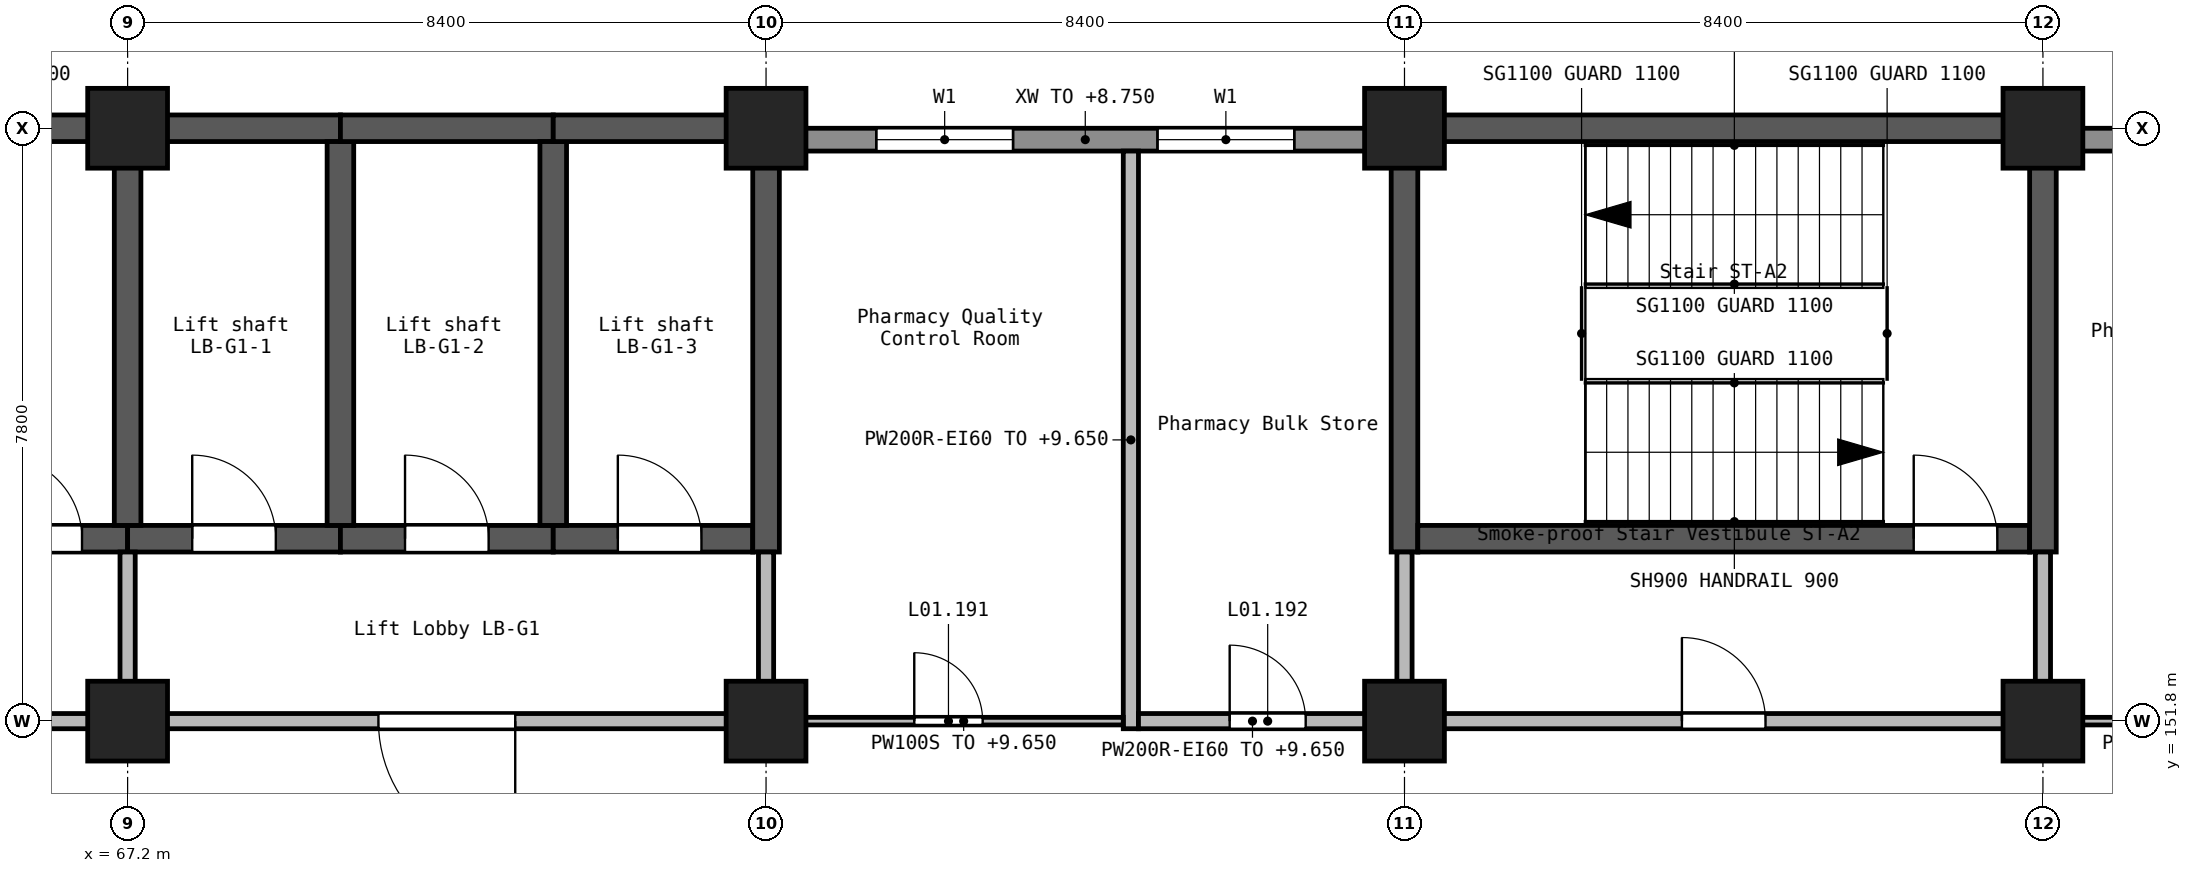
"""IFC4 building model, lengths in metres.
Left out: names, types, materials, properties, quantities, classifications, styles, units other than length and angle.
Written with IfcOpenShell. Run it as: python <this file> out.ifc"""

import sys

from ifc_helpers import new_model, si_unit, direction, frame, frame_2d, origin, origin_2d, place, context, subcontext, project, spatial, rectangle, extrude, element, fill, save


model = new_model("IFC4")
c1 = context("Model", 3, precision=1e-05, world=origin(), true_north=direction((0.0, 1.0)))
c2 = subcontext(c1, "Body", "Model", "MODEL_VIEW")
j1 = project(units=[si_unit("LENGTHUNIT", "METRE"), si_unit("PLANEANGLEUNIT", "RADIAN")], contexts=[c1])
p1 = place(None, origin())
s1 = spatial("IfcSite", under=j1, at=p1, CompositionType="ELEMENT")
p2 = place(p1, origin())
s2 = spatial("IfcBuilding", under=s1, at=p2, CompositionType="ELEMENT")
p3 = place(p2, frame((0.0, 0.0, 5.4)))
s3 = spatial("IfcBuildingStorey", under=s2, at=p3, CompositionType="ELEMENT", Elevation=5.4)
for number, where, z_axis, x_axis in (
    (1, (67.2, 151.8, 0.0), (0.0, 0.0, 1.0), (1.0, 0.0, 0.0)),
    (2, (67.2, 159.6, 0.0), (0.0, 0.0, 1.0), (1.0, 0.0, 0.0)),
    (3, (75.6, 151.8, 0.0), (0.0, 0.0, 1.0), (1.0, 0.0, 0.0)),
    (4, (75.6, 159.6, 0.0), (0.0, 0.0, 1.0), (1.0, 0.0, 0.0)),
    (5, (84.0, 151.8, 0.0), (0.0, 0.0, 1.0), (1.0, 0.0, 0.0)),
    (6, (84.0, 159.6, 0.0), (0.0, 0.0, 1.0), (1.0, 0.0, 0.0)),
    (7, (92.4, 151.8, 0.0), (0.0, 0.0, 1.0), (1.0, 0.0, 0.0)),
    (8, (92.4, 159.6, 0.0), (0.0, 0.0, 1.0), (1.0, 0.0, 0.0)),
):
    element("IfcColumn", number, at=place(p3, frame(where, z_axis=z_axis, x_axis=x_axis)), inside=s3, PredefinedType="COLUMN", context=c2, shape_type="SweptSolid", body=[
        extrude(rectangle(XDim=1.05, YDim=1.05, at=origin_2d()), origin(), (0.0, 0.0, 1.0), 4.5),
    ])
p4 = place(p3, frame((58.625, 159.6, 0.0), z_axis=(0.0, 0.0, 1.0), x_axis=(1.0, 0.0, 0.0)))
e9 = element("IfcWall", 9, at=p4, inside=s3, PredefinedType="SHEAR", context=c2, shape_type="SweptSolid", body=[
    extrude(rectangle(XDim=8.575, YDim=0.35, at=frame_2d((4.288, 0.0))), origin(), (0.0, 0.0, 1.0), 4.5),
])
p5 = place(p3, frame((58.975, 154.2, 0.0), z_axis=(0.0, 0.0, 1.0), x_axis=(1.0, 0.0, 0.0)))
e10 = element("IfcWall", 10, at=p5, inside=s3, PredefinedType="SHEAR", context=c2, shape_type="SweptSolid", body=[
    extrude(rectangle(XDim=8.225, YDim=0.35, at=frame_2d((4.112, 0.0))), origin(), (0.0, 0.0, 1.0), 4.5),
])
p6 = place(p5, frame((6.525, 0.0, 0.0)))
e11 = element("IfcOpeningElement", 11, at=p6, cuts=e10, PredefinedType="OPENING", context=c2, shape_type="SweptSolid", body=[
    extrude(rectangle(XDim=1.1, YDim=2.1, at=frame_2d((0.55, 1.05))), frame((0.0, 0.185, 0.0), z_axis=(0.0, -1.0, 0.0), x_axis=(1.0, 0.0, 0.0)), (0.0, 0.0, 1.0), 0.37),
])
p7 = place(p3, frame((67.2, 154.2, 0.0), z_axis=(0.0, 0.0, 1.0), x_axis=(1.0, 0.0, 0.0)))
e12 = element("IfcWall", 12, at=p7, inside=s3, PredefinedType="SHEAR", context=c2, shape_type="SweptSolid", body=[
    extrude(rectangle(XDim=2.8, YDim=0.35, at=frame_2d((1.4, 0.0))), origin(), (0.0, 0.0, 1.0), 4.5),
])
p8 = place(p7, frame((0.85, 0.0, 0.0)))
e13 = element("IfcOpeningElement", 13, at=p8, cuts=e12, PredefinedType="OPENING", context=c2, shape_type="SweptSolid", body=[
    extrude(rectangle(XDim=1.1, YDim=2.1, at=frame_2d((0.55, 1.05))), frame((0.0, 0.185, 0.0), z_axis=(0.0, -1.0, 0.0), x_axis=(1.0, 0.0, 0.0)), (0.0, 0.0, 1.0), 0.37),
])
p9 = place(p3, frame((67.2, 154.375, 0.0), z_axis=(0.0, 0.0, 1.0), x_axis=(0.0, 1.0, 0.0)))
e14 = element("IfcWall", 14, at=p9, inside=s3, PredefinedType="SHEAR", context=c2, shape_type="SweptSolid", body=[
    extrude(rectangle(XDim=5.05, YDim=0.35, at=frame_2d((2.525, 0.0))), origin(), (0.0, 0.0, 1.0), 4.5),
])
p10 = place(p3, frame((67.2, 159.6, 0.0), z_axis=(0.0, 0.0, 1.0), x_axis=(1.0, 0.0, 0.0)))
e15 = element("IfcWall", 15, at=p10, inside=s3, PredefinedType="SHEAR", context=c2, shape_type="SweptSolid", body=[
    extrude(rectangle(XDim=2.8, YDim=0.35, at=frame_2d((1.4, 0.0))), origin(), (0.0, 0.0, 1.0), 4.5),
])
p11 = place(p3, frame((70.0, 154.2, 0.0), z_axis=(0.0, 0.0, 1.0), x_axis=(1.0, 0.0, 0.0)))
e16 = element("IfcWall", 16, at=p11, inside=s3, PredefinedType="SHEAR", context=c2, shape_type="SweptSolid", body=[
    extrude(rectangle(XDim=2.8, YDim=0.35, at=frame_2d((1.4, 0.0))), origin(), (0.0, 0.0, 1.0), 4.5),
])
p12 = place(p11, frame((0.85, 0.0, 0.0)))
e17 = element("IfcOpeningElement", 17, at=p12, cuts=e16, PredefinedType="OPENING", context=c2, shape_type="SweptSolid", body=[
    extrude(rectangle(XDim=1.1, YDim=2.1, at=frame_2d((0.55, 1.05))), frame((0.0, 0.185, 0.0), z_axis=(0.0, -1.0, 0.0), x_axis=(1.0, 0.0, 0.0)), (0.0, 0.0, 1.0), 0.37),
])
p13 = place(p3, frame((70.0, 154.375, 0.0), z_axis=(0.0, 0.0, 1.0), x_axis=(0.0, 1.0, 0.0)))
e18 = element("IfcWall", 18, at=p13, inside=s3, PredefinedType="SHEAR", context=c2, shape_type="SweptSolid", body=[
    extrude(rectangle(XDim=5.05, YDim=0.35, at=frame_2d((2.525, 0.0))), origin(), (0.0, 0.0, 1.0), 4.5),
])
p14 = place(p3, frame((70.0, 159.6, 0.0), z_axis=(0.0, 0.0, 1.0), x_axis=(1.0, 0.0, 0.0)))
e19 = element("IfcWall", 19, at=p14, inside=s3, PredefinedType="SHEAR", context=c2, shape_type="SweptSolid", body=[
    extrude(rectangle(XDim=2.8, YDim=0.35, at=frame_2d((1.4, 0.0))), origin(), (0.0, 0.0, 1.0), 4.5),
])
p15 = place(p3, frame((72.8, 154.2, 0.0), z_axis=(0.0, 0.0, 1.0), x_axis=(1.0, 0.0, 0.0)))
e20 = element("IfcWall", 20, at=p15, inside=s3, PredefinedType="SHEAR", context=c2, shape_type="SweptSolid", body=[
    extrude(rectangle(XDim=2.625, YDim=0.35, at=frame_2d((1.312, 0.0))), origin(), (0.0, 0.0, 1.0), 4.5),
])
p16 = place(p15, frame((0.85, 0.0, 0.0)))
e21 = element("IfcOpeningElement", 21, at=p16, cuts=e20, PredefinedType="OPENING", context=c2, shape_type="SweptSolid", body=[
    extrude(rectangle(XDim=1.1, YDim=2.1, at=frame_2d((0.55, 1.05))), frame((0.0, 0.185, 0.0), z_axis=(0.0, -1.0, 0.0), x_axis=(1.0, 0.0, 0.0)), (0.0, 0.0, 1.0), 0.37),
])
p17 = place(p3, frame((72.8, 154.375, 0.0), z_axis=(0.0, 0.0, 1.0), x_axis=(0.0, 1.0, 0.0)))
e22 = element("IfcWall", 22, at=p17, inside=s3, PredefinedType="SHEAR", context=c2, shape_type="SweptSolid", body=[
    extrude(rectangle(XDim=5.05, YDim=0.35, at=frame_2d((2.525, 0.0))), origin(), (0.0, 0.0, 1.0), 4.5),
])
p18 = place(p3, frame((72.8, 159.6, 0.0), z_axis=(0.0, 0.0, 1.0), x_axis=(1.0, 0.0, 0.0)))
e23 = element("IfcWall", 23, at=p18, inside=s3, PredefinedType="SHEAR", context=c2, shape_type="SweptSolid", body=[
    extrude(rectangle(XDim=2.625, YDim=0.35, at=frame_2d((1.312, 0.0))), origin(), (0.0, 0.0, 1.0), 4.5),
])
p19 = place(p3, frame((75.6, 154.025, 0.0), z_axis=(0.0, 0.0, 1.0), x_axis=(0.0, 1.0, 0.0)))
e24 = element("IfcWall", 24, at=p19, inside=s3, PredefinedType="SHEAR", context=c2, shape_type="SweptSolid", body=[
    extrude(rectangle(XDim=5.75, YDim=0.35, at=frame_2d((2.875, 0.0))), origin(), (0.0, 0.0, 1.0), 4.5),
])
p20 = place(p3, frame((83.825, 159.6, 0.0), z_axis=(0.0, 0.0, 1.0), x_axis=(1.0, 0.0, 0.0)))
e25 = element("IfcWall", 25, at=p20, inside=s3, PredefinedType="SHEAR", context=c2, shape_type="SweptSolid", body=[
    extrude(rectangle(XDim=8.4, YDim=0.35, at=frame_2d((4.2, 0.0))), origin(), (0.0, 0.0, 1.0), 4.5),
])
p21 = place(p3, frame((84.0, 154.025, 0.0), z_axis=(0.0, 0.0, 1.0), x_axis=(0.0, 1.0, 0.0)))
e26 = element("IfcWall", 26, at=p21, inside=s3, PredefinedType="SHEAR", context=c2, shape_type="SweptSolid", body=[
    extrude(rectangle(XDim=5.4, YDim=0.35, at=frame_2d((2.7, 0.0))), origin(), (0.0, 0.0, 1.0), 4.5),
])
p22 = place(p3, frame((84.175, 154.2, 0.0), z_axis=(0.0, 0.0, 1.0), x_axis=(1.0, 0.0, 0.0)))
e27 = element("IfcWall", 27, at=p22, inside=s3, PredefinedType="SHEAR", context=c2, shape_type="SweptSolid", body=[
    extrude(rectangle(XDim=8.05, YDim=0.35, at=frame_2d((4.025, 0.0))), origin(), (0.0, 0.0, 1.0), 4.5),
])
p23 = place(p22, frame((6.525, 0.0, 0.0)))
e28 = element("IfcOpeningElement", 28, at=p23, cuts=e27, PredefinedType="OPENING", context=c2, shape_type="SweptSolid", body=[
    extrude(rectangle(XDim=1.1, YDim=2.1, at=frame_2d((0.55, 1.05))), frame((0.0, 0.185, 0.0), z_axis=(0.0, -1.0, 0.0), x_axis=(1.0, 0.0, 0.0)), (0.0, 0.0, 1.0), 0.37),
])
p24 = place(p3, frame((92.4, 154.025, 0.0), z_axis=(0.0, 0.0, 1.0), x_axis=(0.0, 1.0, 0.0)))
e29 = element("IfcWall", 29, at=p24, inside=s3, PredefinedType="SHEAR", context=c2, shape_type="SweptSolid", body=[
    extrude(rectangle(XDim=5.75, YDim=0.35, at=frame_2d((2.875, 0.0))), origin(), (0.0, 0.0, 1.0), 4.5),
])
p25 = place(p3, frame((100.3, 159.45, 0.0), z_axis=(0.0, 0.0, 1.0), x_axis=(-1.0, 0.0, 0.0)))
e30 = element("IfcWall", 30, at=p25, inside=s3, PredefinedType="STANDARD", context=c2, shape_type="SweptSolid", body=[
    extrude(rectangle(XDim=7.4, YDim=0.3, at=frame_2d((3.7, 0.0))), origin(), (0.0, 0.0, 1.0), 3.35),
])
p26 = place(p25, frame((0.95, 0.0, 0.9)))
e31 = element("IfcOpeningElement", 31, at=p26, cuts=e30, PredefinedType="OPENING", context=c2, shape_type="SweptSolid", body=[
    extrude(rectangle(XDim=1.8, YDim=1.5, at=frame_2d((0.9, 0.75))), frame((0.0, 0.16, 0.0), z_axis=(0.0, -1.0, 0.0), x_axis=(1.0, 0.0, 0.0)), (0.0, 0.0, 1.0), 0.32),
])
p27 = place(p25, frame((4.65, 0.0, 0.9)))
e32 = element("IfcOpeningElement", 32, at=p27, cuts=e30, PredefinedType="OPENING", context=c2, shape_type="SweptSolid", body=[
    extrude(rectangle(XDim=1.8, YDim=1.5, at=frame_2d((0.9, 0.75))), frame((0.0, 0.16, 0.0), z_axis=(0.0, -1.0, 0.0), x_axis=(1.0, 0.0, 0.0)), (0.0, 0.0, 1.0), 0.32),
])
p28 = place(p3, frame((83.5, 159.45, 0.0), z_axis=(0.0, 0.0, 1.0), x_axis=(-1.0, 0.0, 0.0)))
e33 = element("IfcWall", 33, at=p28, inside=s3, PredefinedType="STANDARD", context=c2, shape_type="SweptSolid", body=[
    extrude(rectangle(XDim=7.4, YDim=0.3, at=frame_2d((3.7, 0.0))), origin(), (0.0, 0.0, 1.0), 3.35),
])
p29 = place(p28, frame((0.95, 0.0, 0.9)))
e34 = element("IfcOpeningElement", 34, at=p29, cuts=e33, PredefinedType="OPENING", context=c2, shape_type="SweptSolid", body=[
    extrude(rectangle(XDim=1.8, YDim=1.5, at=frame_2d((0.9, 0.75))), frame((0.0, 0.16, 0.0), z_axis=(0.0, -1.0, 0.0), x_axis=(1.0, 0.0, 0.0)), (0.0, 0.0, 1.0), 0.32),
])
p30 = place(p28, frame((4.65, 0.0, 0.9)))
e35 = element("IfcOpeningElement", 35, at=p30, cuts=e33, PredefinedType="OPENING", context=c2, shape_type="SweptSolid", body=[
    extrude(rectangle(XDim=1.8, YDim=1.5, at=frame_2d((0.9, 0.75))), frame((0.0, 0.16, 0.0), z_axis=(0.0, -1.0, 0.0), x_axis=(1.0, 0.0, 0.0)), (0.0, 0.0, 1.0), 0.32),
])
p31 = place(p3, frame((75.1, 151.8, 0.0), z_axis=(0.0, 0.0, 1.0), x_axis=(-1.0, 0.0, 0.0)))
e36 = element("IfcWall", 36, at=p31, inside=s3, PredefinedType="SOLIDWALL", context=c2, shape_type="SweptSolid", body=[
    extrude(rectangle(XDim=7.4, YDim=0.2, at=frame_2d((3.7, 0.0))), origin(), (0.0, 0.0, 1.0), 4.25),
])
p32 = place(p31, frame((2.8, 0.0, 0.0)))
e37 = element("IfcOpeningElement", 37, at=p32, cuts=e36, PredefinedType="OPENING", context=c2, shape_type="SweptSolid", body=[
    extrude(rectangle(XDim=1.8, YDim=2.1, at=frame_2d((0.9, 1.05))), frame((0.0, 0.11, 0.0), z_axis=(0.0, -1.0, 0.0), x_axis=(1.0, 0.0, 0.0)), (0.0, 0.0, 1.0), 0.22),
])
p33 = place(p3, frame((66.7, 151.8, 0.0), z_axis=(0.0, 0.0, 1.0), x_axis=(-1.0, 0.0, 0.0)))
e38 = element("IfcWall", 38, at=p33, inside=s3, PredefinedType="SOLIDWALL", context=c2, shape_type="SweptSolid", body=[
    extrude(rectangle(XDim=7.4, YDim=0.2, at=frame_2d((3.7, 0.0))), origin(), (0.0, 0.0, 1.0), 4.25),
])
p34 = place(p33, frame((3.15, 0.0, 0.0)))
e39 = element("IfcOpeningElement", 39, at=p34, cuts=e38, PredefinedType="OPENING", context=c2, shape_type="SweptSolid", body=[
    extrude(rectangle(XDim=1.1, YDim=2.1, at=frame_2d((0.55, 1.05))), frame((0.0, 0.11, 0.0), z_axis=(0.0, -1.0, 0.0), x_axis=(1.0, 0.0, 0.0)), (0.0, 0.0, 1.0), 0.22),
])
p35 = place(p3, frame((84.5, 151.8, 0.0), z_axis=(0.0, 0.0, 1.0), x_axis=(1.0, 0.0, 0.0)))
e40 = element("IfcWall", 40, at=p35, inside=s3, PredefinedType="SOLIDWALL", context=c2, shape_type="SweptSolid", body=[
    extrude(rectangle(XDim=7.4, YDim=0.2, at=frame_2d((3.7, 0.0))), origin(), (0.0, 0.0, 1.0), 4.25),
])
p36 = place(p35, frame((3.15, 0.0, 0.0)))
e41 = element("IfcOpeningElement", 41, at=p36, cuts=e40, PredefinedType="OPENING", context=c2, shape_type="SweptSolid", body=[
    extrude(rectangle(XDim=1.1, YDim=2.1, at=frame_2d((0.55, 1.05))), frame((0.0, 0.11, 0.0), z_axis=(0.0, -1.0, 0.0), x_axis=(1.0, 0.0, 0.0)), (0.0, 0.0, 1.0), 0.22),
])
p37 = place(p3, frame((80.4, 151.7, 0.0), z_axis=(0.0, 0.0, 1.0), x_axis=(0.0, 1.0, 0.0)))
e42 = element("IfcWall", 42, at=p37, inside=s3, PredefinedType="SOLIDWALL", context=c2, shape_type="SweptSolid", body=[
    extrude(rectangle(XDim=7.6, YDim=0.2, at=frame_2d((3.8, 0.0))), origin(), (0.0, 0.0, 1.0), 4.25),
])
p38 = place(p3, frame((80.5, 151.8, 0.0), z_axis=(0.0, 0.0, 1.0), x_axis=(1.0, 0.0, 0.0)))
e43 = element("IfcWall", 43, at=p38, inside=s3, PredefinedType="SOLIDWALL", context=c2, shape_type="SweptSolid", body=[
    extrude(rectangle(XDim=3.0, YDim=0.2, at=frame_2d((1.5, 0.0))), origin(), (0.0, 0.0, 1.0), 4.25),
])
p39 = place(p38, frame((1.2, 0.0, 0.0)))
e44 = element("IfcOpeningElement", 44, at=p39, cuts=e43, PredefinedType="OPENING", context=c2, shape_type="SweptSolid", body=[
    extrude(rectangle(XDim=1.0, YDim=2.1, at=frame_2d((0.5, 1.05))), frame((0.0, 0.11, 0.0), z_axis=(0.0, -1.0, 0.0), x_axis=(1.0, 0.0, 0.0)), (0.0, 0.0, 1.0), 0.22),
])
for number, where, z_axis, x_axis in (
    (45, (67.2, 152.3, 0.0), (0.0, 0.0, 1.0), (0.0, 1.0, 0.0)),
    (46, (75.6, 152.3, 0.0), (0.0, 0.0, 1.0), (0.0, 1.0, 0.0)),
    (47, (84.0, 152.3, 0.0), (0.0, 0.0, 1.0), (0.0, 1.0, 0.0)),
    (48, (92.4, 152.3, 0.0), (0.0, 0.0, 1.0), (0.0, 1.0, 0.0)),
):
    element("IfcWall", number, at=place(p3, frame(where, z_axis=z_axis, x_axis=x_axis)), inside=s3, PredefinedType="SOLIDWALL", context=c2, shape_type="SweptSolid", body=[
        extrude(rectangle(XDim=1.725, YDim=0.2, at=frame_2d((0.862, 0.0))), origin(), (0.0, 0.0, 1.0), 4.25),
    ])
p40 = place(p3, frame((76.1, 151.8, 0.0), z_axis=(0.0, 0.0, 1.0), x_axis=(1.0, 0.0, 0.0)))
e49 = element("IfcWall", 49, at=p40, inside=s3, PredefinedType="PARTITIONING", context=c2, shape_type="SweptSolid", body=[
    extrude(rectangle(XDim=4.2, YDim=0.1, at=frame_2d((2.1, 0.0))), origin(), (0.0, 0.0, 1.0), 4.25),
])
p41 = place(p40, frame((1.45, 0.0, 0.0)))
e50 = element("IfcOpeningElement", 50, at=p41, cuts=e49, PredefinedType="OPENING", context=c2, shape_type="SweptSolid", body=[
    extrude(rectangle(XDim=0.9, YDim=2.1, at=frame_2d((0.45, 1.05))), frame((0.0, 0.06, 0.0), z_axis=(0.0, -1.0, 0.0), x_axis=(1.0, 0.0, 0.0)), (0.0, 0.0, 1.0), 0.12),
])
p42 = place(p3, frame((92.9, 151.8, 0.0), z_axis=(0.0, 0.0, 1.0), x_axis=(1.0, 0.0, 0.0)))
e51 = element("IfcWall", 51, at=p42, inside=s3, PredefinedType="PARTITIONING", context=c2, shape_type="SweptSolid", body=[
    extrude(rectangle(XDim=3.0, YDim=0.1, at=frame_2d((1.5, 0.0))), origin(), (0.0, 0.0, 1.0), 4.25),
])
p43 = place(p42, frame((0.85, 0.0, 0.0)))
e52 = element("IfcOpeningElement", 52, at=p43, cuts=e51, PredefinedType="OPENING", context=c2, shape_type="SweptSolid", body=[
    extrude(rectangle(XDim=0.9, YDim=2.1, at=frame_2d((0.45, 1.05))), frame((0.0, 0.06, 0.0), z_axis=(0.0, -1.0, 0.0), x_axis=(1.0, 0.0, 0.0)), (0.0, 0.0, 1.0), 0.12),
])
p44 = place(p29, origin())
e53 = element("IfcWindow", 53, at=p44, inside=s3, PartitioningType="SINGLE_PANEL", PredefinedType="WINDOW", context=c2, shape_type="SweptSolid", body=[
    extrude(rectangle(XDim=1.8, YDim=1.5, at=frame_2d((0.9, 0.75))), frame((0.0, 0.03, 0.0), z_axis=(0.0, -1.0, 0.0), x_axis=(1.0, 0.0, 0.0)), (0.0, 0.0, 1.0), 0.06),
])
fill(e34, e53)
p45 = place(p30, origin())
e54 = element("IfcWindow", 54, at=p45, inside=s3, PartitioningType="SINGLE_PANEL", PredefinedType="WINDOW", context=c2, shape_type="SweptSolid", body=[
    extrude(rectangle(XDim=1.8, YDim=1.5, at=frame_2d((0.9, 0.75))), frame((0.0, 0.03, 0.0), z_axis=(0.0, -1.0, 0.0), x_axis=(1.0, 0.0, 0.0)), (0.0, 0.0, 1.0), 0.06),
])
fill(e35, e54)
p46 = place(p8, origin())
e55 = element("IfcDoor", 55, at=p46, inside=s3, OperationType="DOUBLE_DOOR_SLIDING", PredefinedType="DOOR", context=c2, shape_type="SweptSolid", body=[
    extrude(rectangle(XDim=1.1, YDim=2.1, at=frame_2d((0.55, 1.05))), frame((0.0, 0.025, 0.0), z_axis=(0.0, -1.0, 0.0), x_axis=(1.0, 0.0, 0.0)), (0.0, 0.0, 1.0), 0.05),
])
fill(e13, e55)
p47 = place(p12, origin())
e56 = element("IfcDoor", 56, at=p47, inside=s3, OperationType="DOUBLE_DOOR_SLIDING", PredefinedType="DOOR", context=c2, shape_type="SweptSolid", body=[
    extrude(rectangle(XDim=1.1, YDim=2.1, at=frame_2d((0.55, 1.05))), frame((0.0, 0.025, 0.0), z_axis=(0.0, -1.0, 0.0), x_axis=(1.0, 0.0, 0.0)), (0.0, 0.0, 1.0), 0.05),
])
fill(e17, e56)
p48 = place(p16, origin())
e57 = element("IfcDoor", 57, at=p48, inside=s3, OperationType="DOUBLE_DOOR_SLIDING", PredefinedType="DOOR", context=c2, shape_type="SweptSolid", body=[
    extrude(rectangle(XDim=1.1, YDim=2.1, at=frame_2d((0.55, 1.05))), frame((0.0, 0.025, 0.0), z_axis=(0.0, -1.0, 0.0), x_axis=(1.0, 0.0, 0.0)), (0.0, 0.0, 1.0), 0.05),
])
fill(e21, e57)
p49 = place(p23, origin())
e58 = element("IfcDoor", 58, at=p49, inside=s3, OperationType="SINGLE_SWING_RIGHT", PredefinedType="DOOR", context=c2, shape_type="SweptSolid", body=[
    extrude(rectangle(XDim=1.1, YDim=2.1, at=frame_2d((0.55, 1.05))), frame((0.0, 0.025, 0.0), z_axis=(0.0, -1.0, 0.0), x_axis=(1.0, 0.0, 0.0)), (0.0, 0.0, 1.0), 0.05),
])
fill(e28, e58)
p50 = place(p6, origin())
e59 = element("IfcDoor", 59, at=p50, inside=s3, OperationType="SINGLE_SWING_RIGHT", PredefinedType="DOOR", context=c2, shape_type="SweptSolid", body=[
    extrude(rectangle(XDim=1.1, YDim=2.1, at=frame_2d((0.55, 1.05))), frame((0.0, 0.025, 0.0), z_axis=(0.0, -1.0, 0.0), x_axis=(1.0, 0.0, 0.0)), (0.0, 0.0, 1.0), 0.05),
])
fill(e11, e59)
p51 = place(p36, origin())
e60 = element("IfcDoor", 60, at=p51, inside=s3, OperationType="SINGLE_SWING_RIGHT", PredefinedType="DOOR", context=c2, shape_type="SweptSolid", body=[
    extrude(rectangle(XDim=1.1, YDim=2.1, at=frame_2d((0.55, 1.05))), frame((0.0, 0.025, 0.0), z_axis=(0.0, -1.0, 0.0), x_axis=(1.0, 0.0, 0.0)), (0.0, 0.0, 1.0), 0.05),
])
fill(e41, e60)
p52 = place(p32, frame((1.8, 0.0, 0.0), z_axis=(0.0, 0.0, 1.0), x_axis=(-1.0, 0.0, 0.0)))
e61 = element("IfcDoor", 61, at=p52, inside=s3, OperationType="DOUBLE_DOOR_SINGLE_SWING", PredefinedType="DOOR", context=c2, shape_type="SweptSolid", body=[
    extrude(rectangle(XDim=1.8, YDim=2.1, at=frame_2d((0.9, 1.05))), frame((0.0, 0.025, 0.0), z_axis=(0.0, -1.0, 0.0), x_axis=(1.0, 0.0, 0.0)), (0.0, 0.0, 1.0), 0.05),
])
fill(e37, e61)
p53 = place(p41, origin())
e62 = element("IfcDoor", 62, at=p53, inside=s3, OperationType="SINGLE_SWING_LEFT", PredefinedType="DOOR", context=c2, shape_type="SweptSolid", body=[
    extrude(rectangle(XDim=0.9, YDim=2.1, at=frame_2d((0.45, 1.05))), frame((0.0, 0.025, 0.0), z_axis=(0.0, -1.0, 0.0), x_axis=(1.0, 0.0, 0.0)), (0.0, 0.0, 1.0), 0.05),
])
fill(e50, e62)
p54 = place(p39, origin())
e63 = element("IfcDoor", 63, at=p54, inside=s3, OperationType="SINGLE_SWING_RIGHT", PredefinedType="DOOR", context=c2, shape_type="SweptSolid", body=[
    extrude(rectangle(XDim=1.0, YDim=2.1, at=frame_2d((0.5, 1.05))), frame((0.0, 0.025, 0.0), z_axis=(0.0, -1.0, 0.0), x_axis=(1.0, 0.0, 0.0)), (0.0, 0.0, 1.0), 0.05),
])
fill(e44, e63)
save(model, sys.argv[1])
